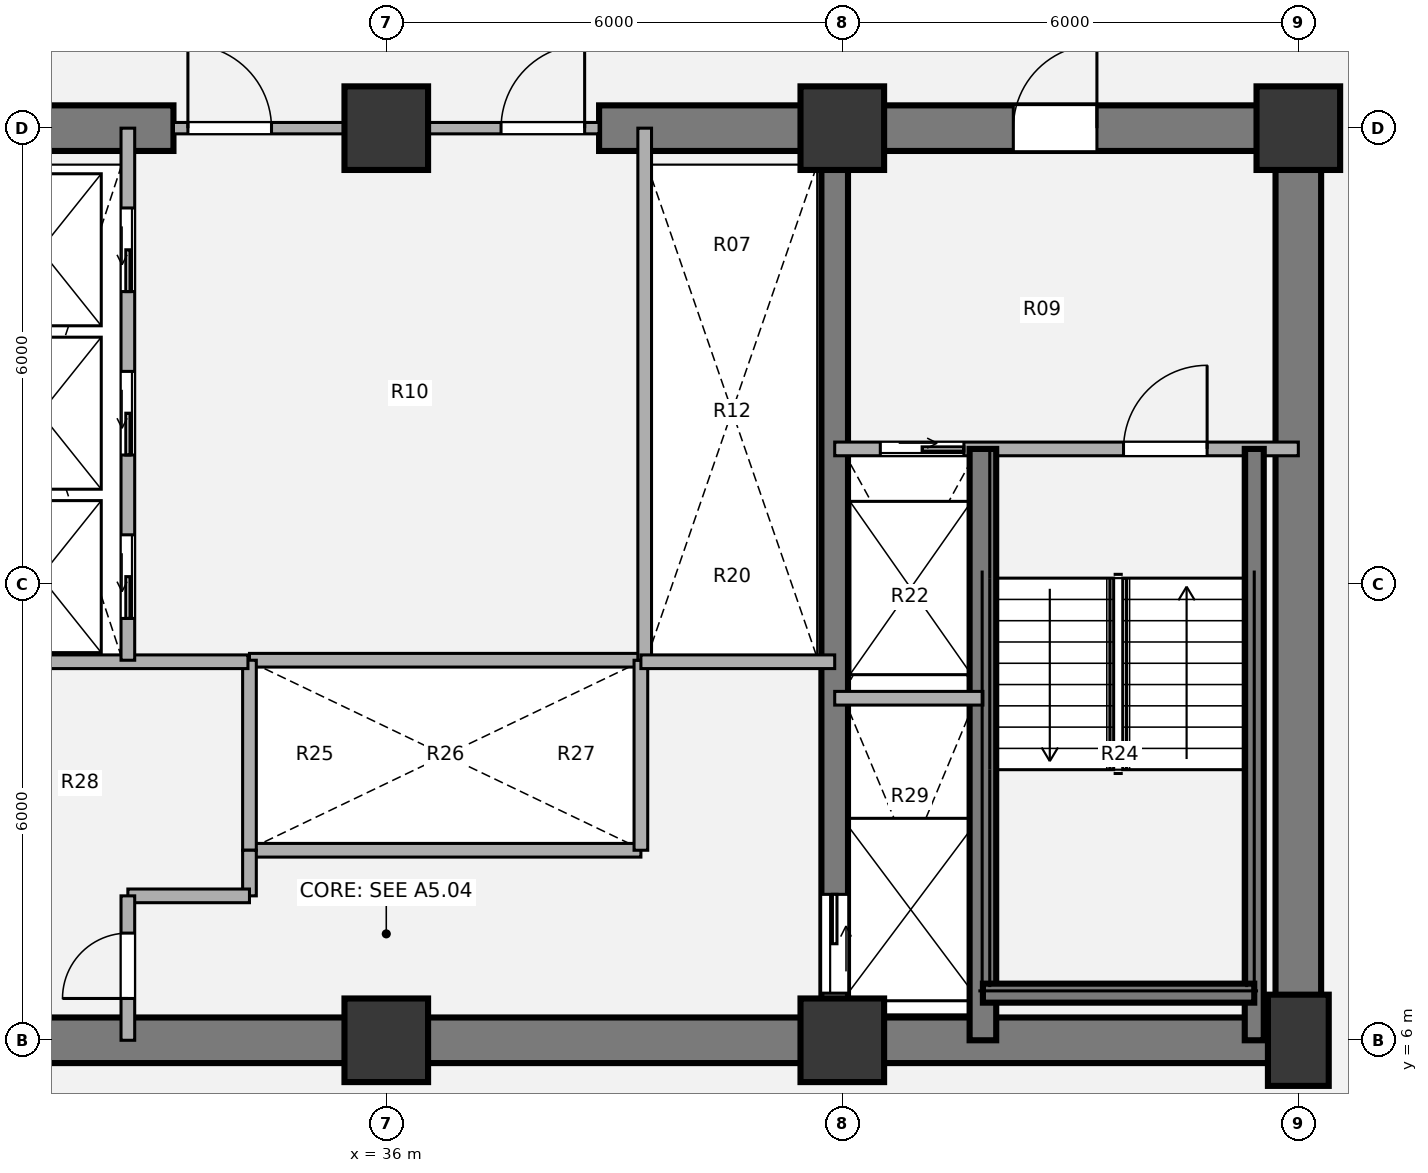
"""IFC4 building model, lengths in metres.
Left out: names, types, materials, properties, quantities, classifications, styles, units other than length and angle.
Written with IfcOpenShell. Run it as: python <this file> out.ifc"""

import sys

from ifc_helpers import new_model, si_unit, direction, frame, frame_2d, origin, origin_2d, place, context, subcontext, project, spatial, rectangle, extrude, source, transform, mapped, element, fill, save


model = new_model("IFC4")
c1 = context("Model", 3, precision=1e-05, world=origin(), true_north=direction((0.0, 1.0)))
c2 = subcontext(c1, "Body", "Model", "MODEL_VIEW")
j1 = project(units=[si_unit("LENGTHUNIT", "METRE"), si_unit("PLANEANGLEUNIT", "RADIAN")], contexts=[c1])
p1 = place(None, origin())
s1 = spatial("IfcSite", under=j1, at=p1, CompositionType="ELEMENT")
p2 = place(p1, origin())
s2 = spatial("IfcBuilding", under=s1, at=p2, CompositionType="ELEMENT")
p3 = place(p2, frame((0.0, 0.0, 49.68)))
s3 = spatial("IfcBuildingStorey", under=s2, at=p3, CompositionType="ELEMENT", Elevation=49.68)
m1 = source(origin(), c2, "Body", "SweptSolid", [
    extrude(rectangle(XDim=1.1, YDim=1.1, at=origin_2d()), origin(), (0.0, 0.0, 1.0), 3.78),
])
for number, where, z_axis, x_axis in (
    (1, (36.0, 6.0, 0.0), (0.0, 0.0, 1.0), (1.0, 0.0, 0.0)),
    (2, (42.0, 6.0, 0.0), (0.0, 0.0, 1.0), (1.0, 0.0, 0.0)),
):
    element("IfcColumn", number, at=place(p3, frame(where, z_axis=z_axis, x_axis=x_axis)), inside=s3, PredefinedType="COLUMN", context=c2, shape_type="MappedRepresentation", body=[
        mapped(m1, transform((0.0, 0.0, 0.0), x_axis=(1.0, 0.0, 0.0), y_axis=(0.0, 1.0, 0.0), z_axis=(0.0, 0.0, 1.0), scale=1.0)),
    ])
m2 = source(origin(), c2, "Body", "SweptSolid", [
    extrude(rectangle(XDim=0.8, YDim=1.2, at=origin_2d()), origin(), (0.0, 0.0, 1.0), 3.78),
])
p4 = place(p3, frame((48.0, 6.0, 0.0), z_axis=(0.0, 0.0, 1.0), x_axis=(1.0, 0.0, 0.0)))
e3 = element("IfcColumn", 3, at=p4, inside=s3, PredefinedType="COLUMN", context=c2, shape_type="MappedRepresentation", body=[
    mapped(m2, transform((0.0, 0.0, 0.0), x_axis=(1.0, 0.0, 0.0), y_axis=(0.0, 1.0, 0.0), z_axis=(0.0, 0.0, 1.0), scale=1.0)),
])
for number, where, z_axis, x_axis in (
    (4, (36.0, 18.0, 0.0), (0.0, 0.0, 1.0), (1.0, 0.0, 0.0)),
    (5, (42.0, 18.0, 0.0), (0.0, 0.0, 1.0), (1.0, 0.0, 0.0)),
    (6, (48.0, 18.0, 0.0), (0.0, 0.0, 1.0), (1.0, 0.0, 0.0)),
):
    element("IfcColumn", number, at=place(p3, frame(where, z_axis=z_axis, x_axis=x_axis)), inside=s3, PredefinedType="COLUMN", context=c2, shape_type="MappedRepresentation", body=[
        mapped(m1, transform((0.0, 0.0, 0.0), x_axis=(1.0, 0.0, 0.0), y_axis=(0.0, 1.0, 0.0), z_axis=(0.0, 0.0, 1.0), scale=1.0)),
    ])
p5 = place(p3, frame((48.3, 6.0, 0.0), z_axis=(0.0, 0.0, 1.0), x_axis=(-1.0, 0.0, 0.0)))
e7 = element("IfcWall", 7, at=p5, inside=s3, PredefinedType="SHEAR", context=c2, shape_type="SweptSolid", body=[
    extrude(rectangle(XDim=24.6, YDim=0.6, at=frame_2d((12.3, 0.0))), origin(), (0.0, 0.0, 1.0), 3.78),
])
p6 = place(p3, frame((48.0, 18.0, 0.0), z_axis=(0.0, 0.0, 1.0), x_axis=(0.0, -1.0, 0.0)))
e8 = element("IfcWall", 8, at=p6, inside=s3, PredefinedType="SHEAR", context=c2, shape_type="SweptSolid", body=[
    extrude(rectangle(XDim=12.0, YDim=0.6, at=frame_2d((6.0, 0.0))), origin(), (0.0, 0.0, 1.0), 3.78),
])
p7 = place(p3, frame((23.7, 18.0, 0.0), z_axis=(0.0, 0.0, 1.0), x_axis=(1.0, 0.0, 0.0)))
e9 = element("IfcWall", 9, at=p7, inside=s3, PredefinedType="SHEAR", context=c2, shape_type="SweptSolid", body=[
    extrude(rectangle(XDim=9.5, YDim=0.6, at=frame_2d((4.75, 0.0))), origin(), (0.0, 0.0, 1.0), 3.78),
])
p8 = place(p7, frame((2.95, 0.0, 0.0)))
e10 = element("IfcOpeningElement", 10, at=p8, cuts=e9, PredefinedType="OPENING", context=c2, shape_type="SweptSolid", body=[
    extrude(rectangle(XDim=1.1, YDim=2.1, at=origin_2d()), frame((0.55, 0.31, 1.05), z_axis=(0.0, -1.0, 0.0), x_axis=(1.0, 0.0, 0.0)), (0.0, 0.0, 1.0), 0.62),
])
p9 = place(p3, frame((38.8, 18.0, 0.0), z_axis=(0.0, 0.0, 1.0), x_axis=(1.0, 0.0, 0.0)))
e11 = element("IfcWall", 11, at=p9, inside=s3, PredefinedType="SHEAR", context=c2, shape_type="SweptSolid", body=[
    extrude(rectangle(XDim=9.5, YDim=0.6, at=frame_2d((4.75, 0.0))), origin(), (0.0, 0.0, 1.0), 3.78),
])
p10 = place(p9, frame((5.45, 0.0, 0.0)))
e12 = element("IfcOpeningElement", 12, at=p10, cuts=e11, PredefinedType="OPENING", context=c2, shape_type="SweptSolid", body=[
    extrude(rectangle(XDim=1.1, YDim=2.1, at=origin_2d()), frame((0.55, 0.31, 1.05), z_axis=(0.0, -1.0, 0.0), x_axis=(1.0, 0.0, 0.0)), (0.0, 0.0, 1.0), 0.62),
])
p11 = place(p3, frame((41.9, 18.0, 0.0), z_axis=(0.0, 0.0, 1.0), x_axis=(0.0, -1.0, 0.0)))
e13 = element("IfcWall", 13, at=p11, inside=s3, PredefinedType="SHEAR", context=c2, shape_type="SweptSolid", body=[
    extrude(rectangle(XDim=12.0, YDim=0.35, at=frame_2d((6.0, 0.0))), origin(), (0.0, 0.0, 1.0), 3.78),
])
p12 = place(p11, frame((10.08, 0.0, 0.0)))
e14 = element("IfcOpeningElement", 14, at=p12, cuts=e13, PredefinedType="OPENING", context=c2, shape_type="SweptSolid", body=[
    extrude(rectangle(XDim=1.3, YDim=2.1, at=origin_2d()), frame((0.65, 0.185, 1.05), z_axis=(0.0, -1.0, 0.0), x_axis=(1.0, 0.0, 0.0)), (0.0, 0.0, 1.0), 0.37),
])
for number, where, z_axis, x_axis in (
    (15, (34.2, 11.0, 0.0), (0.0, 0.0, 1.0), (1.0, 0.0, 0.0)),
    (16, (34.2, 8.5, 0.0), (0.0, 0.0, 1.0), (1.0, 0.0, 0.0)),
):
    element("IfcWall", number, at=place(p3, frame(where, z_axis=z_axis, x_axis=x_axis)), inside=s3, PredefinedType="PARTITIONING", context=c2, shape_type="SweptSolid", body=[
        extrude(rectangle(XDim=5.15, YDim=0.18, at=frame_2d((2.575, 0.0))), origin(), (0.0, 0.0, 1.0), 3.5),
    ])
for number, where, z_axis, x_axis in (
    (17, (34.2, 8.5, 0.0), (0.0, 0.0, 1.0), (0.0, 1.0, 0.0)),
    (18, (39.35, 8.5, 0.0), (0.0, 0.0, 1.0), (0.0, 1.0, 0.0)),
):
    element("IfcWall", number, at=place(p3, frame(where, z_axis=z_axis, x_axis=x_axis)), inside=s3, PredefinedType="PARTITIONING", context=c2, shape_type="SweptSolid", body=[
        extrude(rectangle(XDim=2.5, YDim=0.18, at=frame_2d((1.25, 0.0))), origin(), (0.0, 0.0, 1.0), 3.5),
    ])
p13 = place(p3, frame((39.4, 11.0, 0.0), z_axis=(0.0, 0.0, 1.0), x_axis=(0.0, 1.0, 0.0)))
e19 = element("IfcWall", 19, at=p13, inside=s3, PredefinedType="PARTITIONING", context=c2, shape_type="SweptSolid", body=[
    extrude(rectangle(XDim=7.0, YDim=0.18, at=frame_2d((3.5, 0.0))), origin(), (0.0, 0.0, 1.0), 3.5),
])
p14 = place(p3, frame((30.1, 10.98, 0.0), z_axis=(0.0, 0.0, 1.0), x_axis=(1.0, 0.0, 0.0)))
e20 = element("IfcWall", 20, at=p14, inside=s3, PredefinedType="PARTITIONING", context=c2, shape_type="SweptSolid", body=[
    extrude(rectangle(XDim=4.08, YDim=0.18, at=frame_2d((2.04, 0.0))), origin(), (0.0, 0.0, 1.0), 3.5),
])
p15 = place(p3, frame((34.2, 7.9, 0.0), z_axis=(0.0, 0.0, 1.0), x_axis=(0.0, 1.0, 0.0)))
e21 = element("IfcWall", 21, at=p15, inside=s3, PredefinedType="PARTITIONING", context=c2, shape_type="SweptSolid", body=[
    extrude(rectangle(XDim=0.6, YDim=0.18, at=frame_2d((0.3, 0.0))), origin(), (0.0, 0.0, 1.0), 3.5),
])
p16 = place(p3, frame((32.6, 7.9, 0.0), z_axis=(0.0, 0.0, 1.0), x_axis=(1.0, 0.0, 0.0)))
e22 = element("IfcWall", 22, at=p16, inside=s3, PredefinedType="PARTITIONING", context=c2, shape_type="SweptSolid", body=[
    extrude(rectangle(XDim=1.6, YDim=0.18, at=frame_2d((0.8, 0.0))), origin(), (0.0, 0.0, 1.0), 3.5),
])
p17 = place(p3, frame((32.6, 6.0, 0.0), z_axis=(0.0, 0.0, 1.0), x_axis=(0.0, 1.0, 0.0)))
e23 = element("IfcWall", 23, at=p17, inside=s3, PredefinedType="PARTITIONING", context=c2, shape_type="SweptSolid", body=[
    extrude(rectangle(XDim=1.9, YDim=0.18, at=frame_2d((0.95, 0.0))), origin(), (0.0, 0.0, 1.0), 3.5),
])
p18 = place(p17, frame((0.55, 0.0, 0.0)))
e24 = element("IfcOpeningElement", 24, at=p18, cuts=e23, PredefinedType="OPENING", context=c2, shape_type="SweptSolid", body=[
    extrude(rectangle(XDim=0.86, YDim=2.1, at=origin_2d()), frame((0.43, 0.1, 1.05), z_axis=(0.0, -1.0, 0.0), x_axis=(1.0, 0.0, 0.0)), (0.0, 0.0, 1.0), 0.2),
])
p19 = place(p3, frame((39.35, 10.98, 0.0), z_axis=(0.0, 0.0, 1.0), x_axis=(1.0, 0.0, 0.0)))
e25 = element("IfcWall", 25, at=p19, inside=s3, PredefinedType="PARTITIONING", context=c2, shape_type="SweptSolid", body=[
    extrude(rectangle(XDim=2.55, YDim=0.18, at=frame_2d((1.275, 0.0))), origin(), (0.0, 0.0, 1.0), 3.5),
])
p20 = place(p3, frame((33.2, 18.0, 0.0), z_axis=(0.0, 0.0, 1.0), x_axis=(1.0, 0.0, 0.0)))
e26 = element("IfcWall", 26, at=p20, inside=s3, PredefinedType="PARTITIONING", context=c2, shape_type="SweptSolid", body=[
    extrude(rectangle(XDim=5.6, YDim=0.15, at=frame_2d((2.8, 0.0))), origin(), (0.0, 0.0, 1.0), 2.315),
])
p21 = place(p20, frame((0.19, 0.0, 0.0)))
e27 = element("IfcOpeningElement", 27, at=p21, cuts=e26, PredefinedType="OPENING", context=c2, shape_type="SweptSolid", body=[
    extrude(rectangle(XDim=1.1, YDim=2.1, at=origin_2d()), frame((0.55, 0.085, 1.05), z_axis=(0.0, -1.0, 0.0), x_axis=(1.0, 0.0, 0.0)), (0.0, 0.0, 1.0), 0.17),
])
p22 = place(p20, frame((4.31, 0.0, 0.0)))
e28 = element("IfcOpeningElement", 28, at=p22, cuts=e26, PredefinedType="OPENING", context=c2, shape_type="SweptSolid", body=[
    extrude(rectangle(XDim=1.1, YDim=2.1, at=origin_2d()), frame((0.55, 0.085, 1.05), z_axis=(0.0, -1.0, 0.0), x_axis=(1.0, 0.0, 0.0)), (0.0, 0.0, 1.0), 0.17),
])
p23 = place(p3, frame((41.9, 13.78, 0.0), z_axis=(0.0, 0.0, 1.0), x_axis=(1.0, 0.0, 0.0)))
e29 = element("IfcWall", 29, at=p23, inside=s3, PredefinedType="PARTITIONING", context=c2, shape_type="SweptSolid", body=[
    extrude(rectangle(XDim=6.1, YDim=0.18, at=frame_2d((3.05, 0.0))), origin(), (0.0, 0.0, 1.0), 3.5),
])
p24 = place(p23, frame((0.6, 0.0, 0.0)))
e30 = element("IfcOpeningElement", 30, at=p24, cuts=e29, PredefinedType="OPENING", context=c2, shape_type="SweptSolid", body=[
    extrude(rectangle(XDim=1.1, YDim=2.1, at=origin_2d()), frame((0.55, 0.1, 1.05), z_axis=(0.0, -1.0, 0.0), x_axis=(1.0, 0.0, 0.0)), (0.0, 0.0, 1.0), 0.2),
])
p25 = place(p23, frame((3.8, 0.0, 0.0)))
e31 = element("IfcOpeningElement", 31, at=p25, cuts=e29, PredefinedType="OPENING", context=c2, shape_type="SweptSolid", body=[
    extrude(rectangle(XDim=1.1, YDim=2.1, at=origin_2d()), frame((0.55, 0.1, 1.05), z_axis=(0.0, -1.0, 0.0), x_axis=(1.0, 0.0, 0.0)), (0.0, 0.0, 1.0), 0.2),
])
p26 = place(p3, frame((43.85, 6.0, 0.0), z_axis=(0.0, 0.0, 1.0), x_axis=(0.0, 1.0, 0.0)))
e32 = element("IfcWall", 32, at=p26, inside=s3, PredefinedType="SHEAR", context=c2, shape_type="SweptSolid", body=[
    extrude(rectangle(XDim=7.78, YDim=0.35, at=frame_2d((3.89, 0.0))), origin(), (0.0, 0.0, 1.0), 3.85),
])
p27 = place(p3, frame((47.42, 6.0, 0.0), z_axis=(0.0, 0.0, 1.0), x_axis=(0.0, 1.0, 0.0)))
e33 = element("IfcWall", 33, at=p27, inside=s3, PredefinedType="SHEAR", context=c2, shape_type="SweptSolid", body=[
    extrude(rectangle(XDim=7.78, YDim=0.25, at=frame_2d((3.89, 0.0))), origin(), (0.0, 0.0, 1.0), 3.85),
])
p28 = place(p3, frame((43.85, 6.62, 0.0), z_axis=(0.0, 0.0, 1.0), x_axis=(1.0, 0.0, 0.0)))
e34 = element("IfcWall", 34, at=p28, inside=s3, PredefinedType="SHEAR", context=c2, shape_type="SweptSolid", body=[
    extrude(rectangle(XDim=3.57, YDim=0.25, at=frame_2d((1.785, 0.0))), origin(), (0.0, 0.0, 1.0), 3.85),
])
p29 = place(p3, frame((41.9, 10.5, 0.0), z_axis=(0.0, 0.0, 1.0), x_axis=(1.0, 0.0, 0.0)))
e35 = element("IfcWall", 35, at=p29, inside=s3, PredefinedType="PARTITIONING", context=c2, shape_type="SweptSolid", body=[
    extrude(rectangle(XDim=1.95, YDim=0.18, at=frame_2d((0.975, 0.0))), origin(), (0.0, 0.0, 1.0), 3.5),
])
p30 = place(p3, frame((32.6, 11.0, 0.0), z_axis=(0.0, 0.0, 1.0), x_axis=(0.0, 1.0, 0.0)))
e36 = element("IfcWall", 36, at=p30, inside=s3, PredefinedType="PARTITIONING", context=c2, shape_type="SweptSolid", body=[
    extrude(rectangle(XDim=7.0, YDim=0.18, at=frame_2d((3.5, 0.0))), origin(), (0.0, 0.0, 1.0), 3.5),
])
p31 = place(p30, frame((0.55, 0.0, 0.0)))
e37 = element("IfcOpeningElement", 37, at=p31, cuts=e36, PredefinedType="OPENING", context=c2, shape_type="SweptSolid", body=[
    extrude(rectangle(XDim=1.1, YDim=2.1, at=origin_2d()), frame((0.55, 0.1, 1.05), z_axis=(0.0, -1.0, 0.0), x_axis=(1.0, 0.0, 0.0)), (0.0, 0.0, 1.0), 0.2),
])
p32 = place(p30, frame((2.7, 0.0, 0.0)))
e38 = element("IfcOpeningElement", 38, at=p32, cuts=e36, PredefinedType="OPENING", context=c2, shape_type="SweptSolid", body=[
    extrude(rectangle(XDim=1.1, YDim=2.1, at=origin_2d()), frame((0.55, 0.1, 1.05), z_axis=(0.0, -1.0, 0.0), x_axis=(1.0, 0.0, 0.0)), (0.0, 0.0, 1.0), 0.2),
])
p33 = place(p30, frame((4.85, 0.0, 0.0)))
e39 = element("IfcOpeningElement", 39, at=p33, cuts=e36, PredefinedType="OPENING", context=c2, shape_type="SweptSolid", body=[
    extrude(rectangle(XDim=1.1, YDim=2.1, at=origin_2d()), frame((0.55, 0.1, 1.05), z_axis=(0.0, -1.0, 0.0), x_axis=(1.0, 0.0, 0.0)), (0.0, 0.0, 1.0), 0.2),
])
m3 = source(origin(), c2, "Body", "SweptSolid", [
    extrude(rectangle(XDim=0.86, YDim=2.1, at=origin_2d()), frame((0.43, 0.025, 1.05), z_axis=(0.0, -1.0, 0.0), x_axis=(1.0, 0.0, 0.0)), (0.0, 0.0, 1.0), 0.05),
])
p34 = place(p18, origin())
e40 = element("IfcDoor", 40, at=p34, inside=s3, OperationType="SINGLE_SWING_LEFT", PredefinedType="DOOR", context=c2, shape_type="MappedRepresentation", body=[
    mapped(m3, transform((0.0, 0.0, 0.0), x_axis=(1.0, 0.0, 0.0), y_axis=(0.0, 1.0, 0.0), z_axis=(0.0, 0.0, 1.0), scale=1.0)),
])
fill(e24, e40)
m4 = source(origin(), c2, "Body", "SweptSolid", [
    extrude(rectangle(XDim=1.1, YDim=2.1, at=origin_2d()), frame((0.55, 0.025, 1.05), z_axis=(0.0, -1.0, 0.0), x_axis=(1.0, 0.0, 0.0)), (0.0, 0.0, 1.0), 0.05),
])
p35 = place(p21, origin())
e41 = element("IfcDoor", 41, at=p35, inside=s3, OperationType="SINGLE_SWING_LEFT", PredefinedType="DOOR", context=c2, shape_type="MappedRepresentation", body=[
    mapped(m4, transform((0.0, 0.0, 0.0), x_axis=(1.0, 0.0, 0.0), y_axis=(0.0, 1.0, 0.0), z_axis=(0.0, 0.0, 1.0), scale=1.0)),
])
fill(e27, e41)
p36 = place(p22, origin())
e42 = element("IfcDoor", 42, at=p36, inside=s3, OperationType="SINGLE_SWING_RIGHT", PredefinedType="DOOR", context=c2, shape_type="MappedRepresentation", body=[
    mapped(m4, transform((0.0, 0.0, 0.0), x_axis=(1.0, 0.0, 0.0), y_axis=(0.0, 1.0, 0.0), z_axis=(0.0, 0.0, 1.0), scale=1.0)),
])
fill(e28, e42)
m5 = source(origin(), c2, "Body", "SweptSolid", [
    extrude(rectangle(XDim=1.1, YDim=2.1, at=origin_2d()), frame((0.55, 0.025, 1.05), z_axis=(0.0, -1.0, 0.0), x_axis=(1.0, 0.0, 0.0)), (0.0, 0.0, 1.0), 0.05),
])
p37 = place(p24, origin())
e43 = element("IfcDoor", 43, at=p37, inside=s3, OperationType="SLIDING_TO_RIGHT", PredefinedType="DOOR", context=c2, shape_type="MappedRepresentation", body=[
    mapped(m5, transform((0.0, 0.0, 0.0), x_axis=(1.0, 0.0, 0.0), y_axis=(0.0, 1.0, 0.0), z_axis=(0.0, 0.0, 1.0), scale=1.0)),
])
fill(e30, e43)
m6 = source(origin(), c2, "Body", "SweptSolid", [
    extrude(rectangle(XDim=1.1, YDim=2.1, at=origin_2d()), frame((0.55, 0.025, 1.05), z_axis=(0.0, -1.0, 0.0), x_axis=(1.0, 0.0, 0.0)), (0.0, 0.0, 1.0), 0.05),
])
p38 = place(p25, origin())
e44 = element("IfcDoor", 44, at=p38, inside=s3, OperationType="SINGLE_SWING_RIGHT", PredefinedType="DOOR", context=c2, shape_type="MappedRepresentation", body=[
    mapped(m6, transform((0.0, 0.0, 0.0), x_axis=(1.0, 0.0, 0.0), y_axis=(0.0, 1.0, 0.0), z_axis=(0.0, 0.0, 1.0), scale=1.0)),
])
fill(e31, e44)
m7 = source(origin(), c2, "Body", "SweptSolid", [
    extrude(rectangle(XDim=1.3, YDim=2.1, at=origin_2d()), frame((0.65, 0.025, 1.05), z_axis=(0.0, -1.0, 0.0), x_axis=(1.0, 0.0, 0.0)), (0.0, 0.0, 1.0), 0.05),
])
p39 = place(p12, origin())
e45 = element("IfcDoor", 45, at=p39, inside=s3, OperationType="SLIDING_TO_LEFT", PredefinedType="DOOR", context=c2, shape_type="MappedRepresentation", body=[
    mapped(m7, transform((0.0, 0.0, 0.0), x_axis=(1.0, 0.0, 0.0), y_axis=(0.0, 1.0, 0.0), z_axis=(0.0, 0.0, 1.0), scale=1.0)),
])
fill(e14, e45)
p40 = place(p10, origin())
e46 = element("IfcDoor", 46, at=p40, inside=s3, OperationType="SINGLE_SWING_RIGHT", PredefinedType="DOOR", context=c2, shape_type="MappedRepresentation", body=[
    mapped(m4, transform((0.0, 0.0, 0.0), x_axis=(1.0, 0.0, 0.0), y_axis=(0.0, 1.0, 0.0), z_axis=(0.0, 0.0, 1.0), scale=1.0)),
])
fill(e12, e46)
p41 = place(p31, origin())
e47 = element("IfcDoor", 47, at=p41, inside=s3, OperationType="SLIDING_TO_LEFT", PredefinedType="DOOR", context=c2, shape_type="MappedRepresentation", body=[
    mapped(m5, transform((0.0, 0.0, 0.0), x_axis=(1.0, 0.0, 0.0), y_axis=(0.0, 1.0, 0.0), z_axis=(0.0, 0.0, 1.0), scale=1.0)),
])
fill(e37, e47)
p42 = place(p32, origin())
e48 = element("IfcDoor", 48, at=p42, inside=s3, OperationType="SLIDING_TO_LEFT", PredefinedType="DOOR", context=c2, shape_type="MappedRepresentation", body=[
    mapped(m5, transform((0.0, 0.0, 0.0), x_axis=(1.0, 0.0, 0.0), y_axis=(0.0, 1.0, 0.0), z_axis=(0.0, 0.0, 1.0), scale=1.0)),
])
fill(e38, e48)
p43 = place(p33, origin())
e49 = element("IfcDoor", 49, at=p43, inside=s3, OperationType="SLIDING_TO_LEFT", PredefinedType="DOOR", context=c2, shape_type="MappedRepresentation", body=[
    mapped(m5, transform((0.0, 0.0, 0.0), x_axis=(1.0, 0.0, 0.0), y_axis=(0.0, 1.0, 0.0), z_axis=(0.0, 0.0, 1.0), scale=1.0)),
])
fill(e39, e49)
save(model, sys.argv[1])
